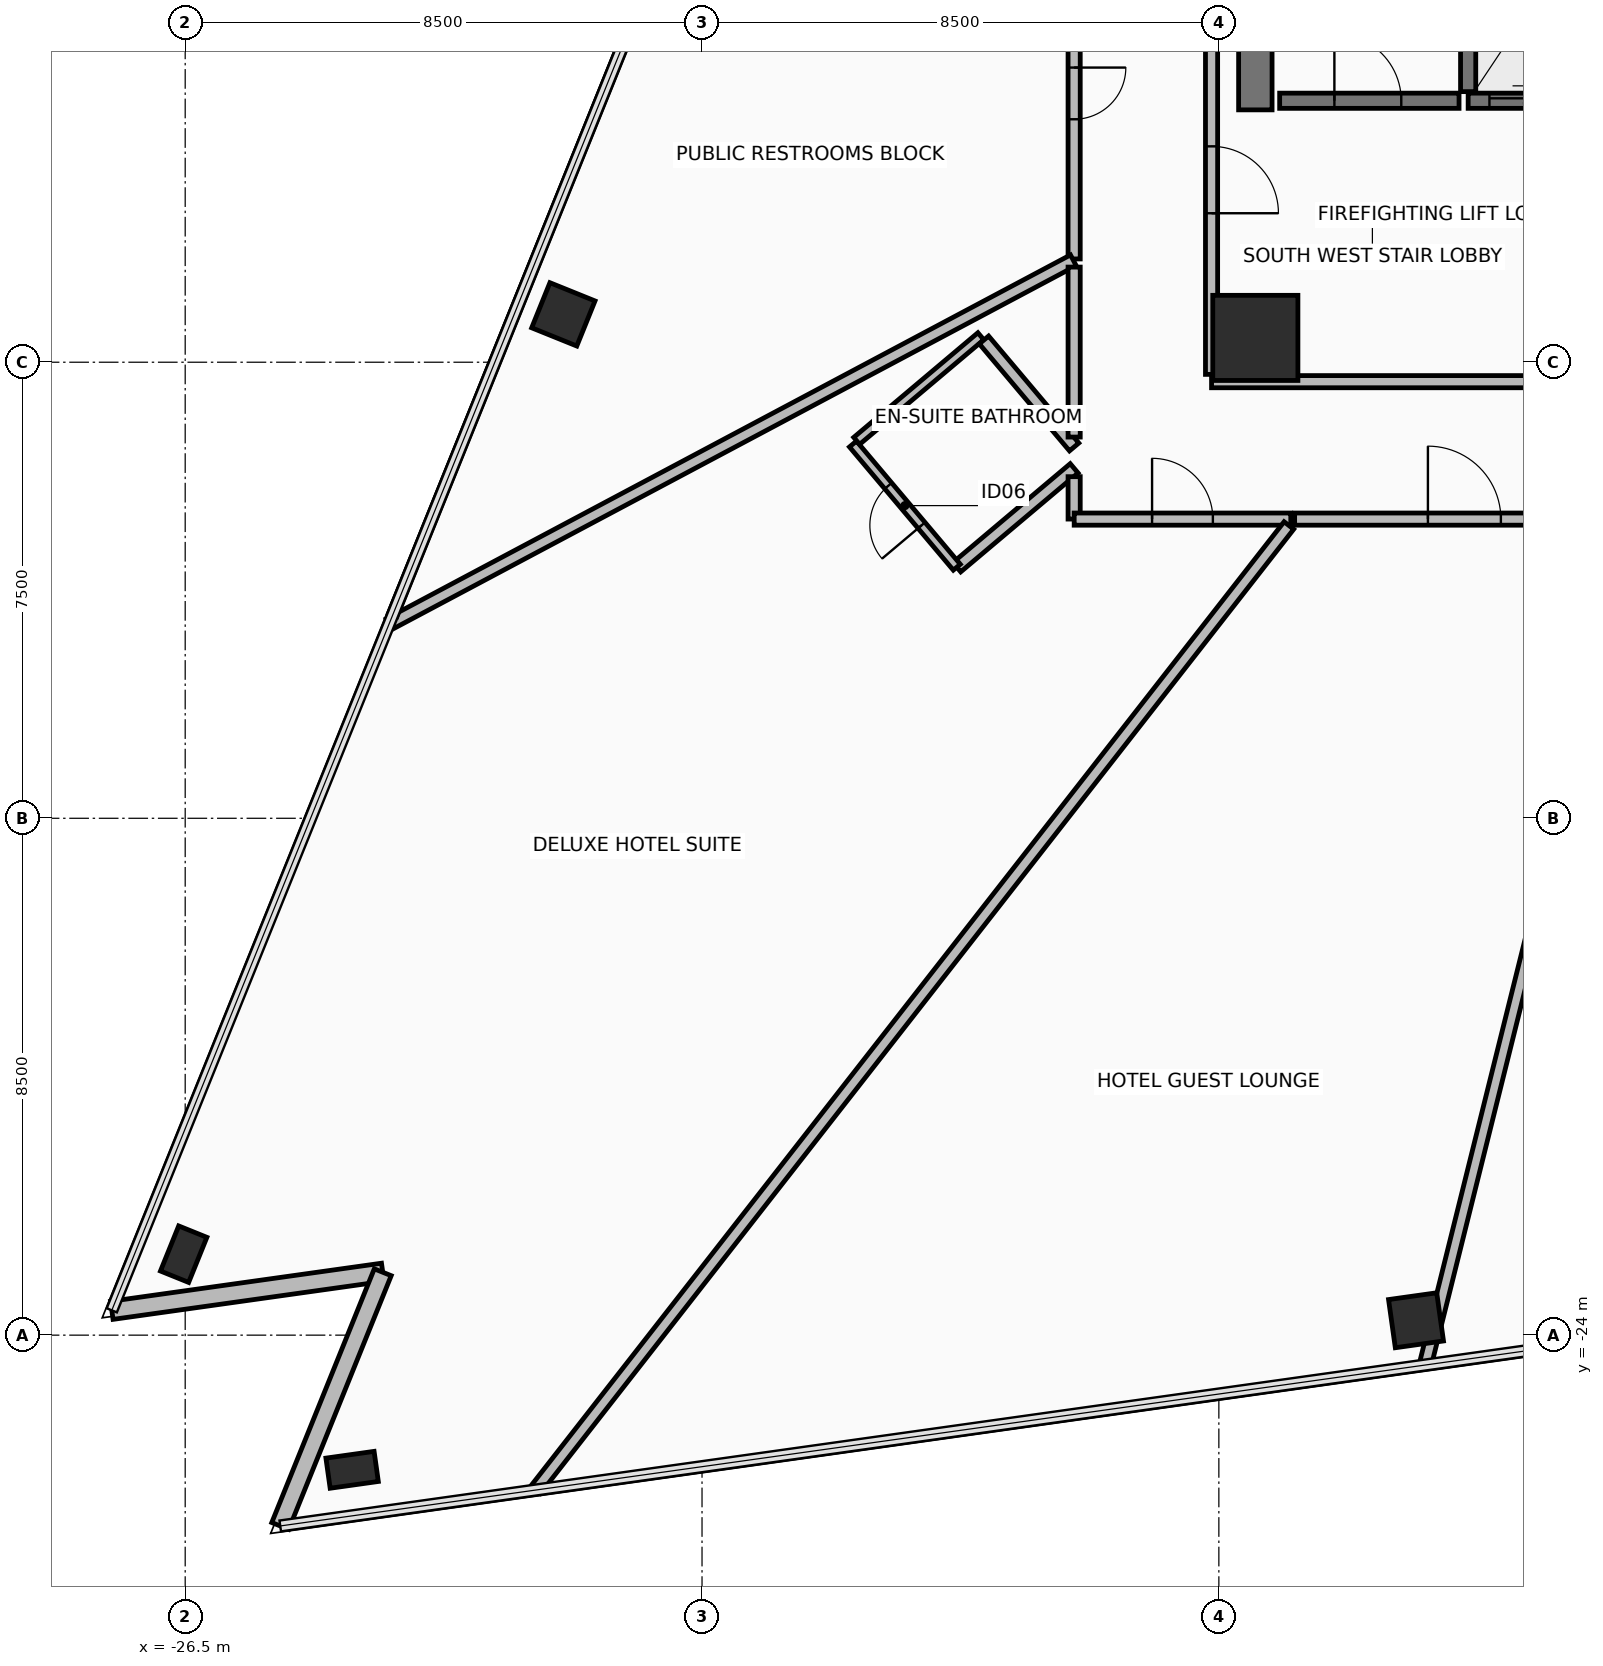
"""IFC4 building model, lengths in metres.
Left out: names, types, materials, properties, quantities, classifications, styles, units other than length and angle.
Written with IfcOpenShell. Run it as: python <this file> out.ifc"""

import sys

from ifc_helpers import new_model, si_unit, direction, frame, frame_2d, origin, origin_2d, place, context, subcontext, project, spatial, rectangle, hollow_rectangle, extrude, element, fill, save


model = new_model("IFC4")
c1 = context("Model", 3, precision=1e-05, world=origin(), true_north=direction((0.0, 1.0)))
c2 = subcontext(c1, "Body", "Model", "MODEL_VIEW")
j1 = project(units=[si_unit("LENGTHUNIT", "METRE"), si_unit("PLANEANGLEUNIT", "RADIAN")], contexts=[c1])
p1 = place(None, origin())
s1 = spatial("IfcSite", under=j1, at=p1, CompositionType="ELEMENT")
p2 = place(p1, origin())
s2 = spatial("IfcBuilding", under=s1, at=p2, CompositionType="ELEMENT")
p3 = place(p2, frame((0.0, 0.0, 77.65)))
s3 = spatial("IfcBuildingStorey", under=s2, at=p3, CompositionType="ELEMENT", Elevation=77.65)
p4 = place(p3, frame((-8.9, -7.6, 0.0), z_axis=(0.0, 0.0, 1.0), x_axis=(1.0, 0.0, 0.0)))
e1 = element("IfcColumn", 1, at=p4, inside=s3, PredefinedType="COLUMN", context=c2, shape_type="SweptSolid", body=[
    extrude(rectangle(XDim=1.4, YDim=1.4, at=origin_2d()), origin(), (0.0, 0.0, 1.0), 3.45),
])
p5 = place(p3, frame((-20.281, -7.213, 0.0), z_axis=(0.0, 0.0, 1.0), x_axis=(0.374608211656, 0.927183200754, 0.0)))
e2 = element("IfcColumn", 2, at=p5, inside=s3, PredefinedType="COLUMN", context=c2, shape_type="SweptSolid", body=[
    extrude(hollow_rectangle(XDim=0.8, YDim=0.8, WallThickness=0.045, at=origin_2d()), origin(), (0.0, 0.0, 1.0), 3.45),
])
for number, where, z_axis, x_axis in (
    (3, (-26.525, -22.668, 0.0), (0.0, 0.0, 1.0), (0.375, 0.927, 0.0)),
    (4, (-23.755, -26.214, 0.0), (0.0, 0.0, 1.0), (0.99, 0.139, 0.0)),
):
    element("IfcColumn", number, at=place(p3, frame(where, z_axis=z_axis, x_axis=x_axis)), inside=s3, PredefinedType="COLUMN", context=c2, shape_type="SweptSolid", body=[
        extrude(hollow_rectangle(XDim=0.5, YDim=0.8, WallThickness=0.04, at=origin_2d()), origin(), (0.0, 0.0, 1.0), 3.45),
    ])
p6 = place(p3, frame((-6.257, -23.755, 0.0), z_axis=(0.0, 0.0, 1.0), x_axis=(0.990268068742, 0.13917310096, 0.0)))
e5 = element("IfcColumn", 5, at=p6, inside=s3, PredefinedType="COLUMN", context=c2, shape_type="SweptSolid", body=[
    extrude(hollow_rectangle(XDim=0.8, YDim=0.8, WallThickness=0.045, at=origin_2d()), origin(), (0.0, 0.0, 1.0), 3.45),
])
p7 = place(p3, frame((-27.707, -23.592, 0.0), z_axis=(0.0, 0.0, 1.0), x_axis=(0.990269200152, 0.139165050317, 0.0)))
e6 = element("IfcWall", 6, at=p7, inside=s3, PredefinedType="STANDARD", context=c2, shape_type="SweptSolid", body=[
    extrude(rectangle(XDim=4.5, YDim=0.3, at=frame_2d((2.25, 0.0))), origin(), (0.0, 0.0, 1.0), 2.405),
])
p8 = place(p3, frame((-23.251, -22.966, 0.0), z_axis=(0.0, 0.0, 1.0), x_axis=(-0.374568898324, -0.927199083481, 0.0)))
e7 = element("IfcWall", 7, at=p8, inside=s3, PredefinedType="STANDARD", context=c2, shape_type="SweptSolid", body=[
    extrude(rectangle(XDim=4.5, YDim=0.3, at=frame_2d((2.25, 0.0))), origin(), (0.0, 0.0, 1.0), 2.405),
])
p9 = place(p3, frame((-8.9, -3.85, 0.0), z_axis=(0.0, 0.0, 1.0), x_axis=(0.0, 1.0, 0.0)))
e8 = element("IfcWall", 8, at=p9, inside=s3, PredefinedType="SHEAR", context=c2, shape_type="SweptSolid", body=[
    extrude(rectangle(XDim=10.7, YDim=0.55, at=frame_2d((5.35, 0.0))), origin(), (0.0, 0.0, 1.0), 3.21),
])
p10 = place(p3, frame((-9.62, -8.32, 0.0), z_axis=(0.0, 0.0, 1.0), x_axis=(1.0, 0.0, 0.0)))
e9 = element("IfcWall", 9, at=p10, inside=s3, PredefinedType="PARTITIONING", context=c2, shape_type="SweptSolid", body=[
    extrude(rectangle(XDim=19.24, YDim=0.2, at=frame_2d((9.62, 0.0))), origin(), (0.0, 0.0, 1.0), 2.605),
])
p11 = place(p10, frame((15.02, 0.0, 0.0)))
e10 = element("IfcOpeningElement", 10, at=p11, cuts=e9, PredefinedType="OPENING", context=c2, shape_type="SweptSolid", body=[
    extrude(rectangle(XDim=0.9, YDim=2.1, at=frame_2d((0.45, 1.05))), frame((0.0, 0.11, 0.0), z_axis=(0.0, -1.0, 0.0), x_axis=(1.0, 0.0, 0.0)), (0.0, 0.0, 1.0), 0.22),
])
p12 = place(p3, frame((-9.62, 8.2, 0.0), z_axis=(0.0, 0.0, 1.0), x_axis=(0.0, -1.0, 0.0)))
e11 = element("IfcWall", 11, at=p12, inside=s3, PredefinedType="PARTITIONING", context=c2, shape_type="SweptSolid", body=[
    extrude(rectangle(XDim=16.4, YDim=0.2, at=frame_2d((8.2, 0.0))), origin(), (0.0, 0.0, 1.0), 2.605),
])
p13 = place(p12, frame((12.65, 0.0, 0.0)))
e12 = element("IfcOpeningElement", 12, at=p13, cuts=e11, PredefinedType="OPENING", context=c2, shape_type="SweptSolid", body=[
    extrude(rectangle(XDim=1.1, YDim=2.15, at=frame_2d((0.55, 1.075))), frame((0.0, 0.11, 0.0), z_axis=(0.0, -1.0, 0.0), x_axis=(1.0, 0.0, 0.0)), (0.0, 0.0, 1.0), 0.22),
])
p14 = place(p3, frame((-5.4, -3.55, 0.0), z_axis=(0.0, 0.0, 1.0), x_axis=(0.0, 1.0, 0.0)))
e13 = element("IfcWall", 13, at=p14, inside=s3, PredefinedType="SHEAR", context=c2, shape_type="SweptSolid", body=[
    extrude(rectangle(XDim=7.3, YDim=0.25, at=frame_2d((3.65, 0.0))), origin(), (0.0, 0.0, 1.0), 3.21),
])
p15 = place(p3, frame((-8.5, -3.7, 0.0), z_axis=(0.0, 0.0, 1.0), x_axis=(1.0, 0.0, 0.0)))
e14 = element("IfcWall", 14, at=p15, inside=s3, PredefinedType="SHEAR", context=c2, shape_type="SweptSolid", body=[
    extrude(rectangle(XDim=2.95, YDim=0.25, at=frame_2d((1.475, 0.0))), origin(), (0.0, 0.0, 1.0), 3.21),
])
p16 = place(p15, frame((0.9, 0.0, 0.0)))
e15 = element("IfcOpeningElement", 15, at=p16, cuts=e14, PredefinedType="OPENING", context=c2, shape_type="SweptSolid", body=[
    extrude(rectangle(XDim=1.1, YDim=2.15, at=frame_2d((0.55, 1.075))), frame((0.0, 0.135, 0.0), z_axis=(0.0, -1.0, 0.0), x_axis=(1.0, 0.0, 0.0)), (0.0, 0.0, 1.0), 0.27),
])
p17 = place(p3, frame((-5.4, -3.7, 0.0), z_axis=(0.0, 0.0, 1.0), x_axis=(1.0, 0.0, 0.0)))
e16 = element("IfcWall", 16, at=p17, inside=s3, PredefinedType="SHEAR", context=c2, shape_type="SweptSolid", body=[
    extrude(rectangle(XDim=1.9, YDim=0.25, at=frame_2d((0.95, 0.0))), origin(), (0.0, 0.0, 1.0), 3.21),
])
p18 = place(p17, frame((0.35, 0.0, 0.0)))
e17 = element("IfcOpeningElement", 17, at=p18, cuts=e16, PredefinedType="OPENING", context=c2, shape_type="SweptSolid", body=[
    extrude(rectangle(XDim=1.2, YDim=2.2, at=frame_2d((0.6, 1.1))), frame((0.0, 0.135, 0.0), z_axis=(0.0, -1.0, 0.0), x_axis=(1.0, 0.0, 0.0)), (0.0, 0.0, 1.0), 0.27),
])
p19 = place(p3, frame((-11.88, -9.745, 0.0), z_axis=(0.0, 0.0, 1.0), x_axis=(-0.764712982519, -0.644371053328, 0.0)))
e18 = element("IfcWall", 18, at=p19, inside=s3, PredefinedType="PARTITIONING", context=c2, shape_type="SweptSolid", body=[
    extrude(rectangle(XDim=2.524, YDim=0.2, at=frame_2d((1.262, 0.0))), origin(), (0.0, 0.0, 1.0), 3.21),
])
p20 = place(p3, frame((-13.81, -11.371, 0.0), z_axis=(0.0, 0.0, 1.0), x_axis=(-0.644478981733, 0.764622025647, 0.0)))
e19 = element("IfcWall", 19, at=p20, inside=s3, PredefinedType="PARTITIONING", context=c2, shape_type="SweptSolid", body=[
    extrude(rectangle(XDim=2.65, YDim=0.15, at=frame_2d((1.325, 0.0))), origin(), (0.0, 0.0, 1.0), 2.805),
])
p21 = place(p20, frame((0.9, 0.0, 0.0)))
e20 = element("IfcOpeningElement", 20, at=p21, cuts=e19, PredefinedType="OPENING", context=c2, shape_type="SweptSolid", body=[
    extrude(rectangle(XDim=0.85, YDim=2.1, at=frame_2d((0.425, 1.05))), frame((0.0, 0.085, 0.0), z_axis=(0.0, -1.0, 0.0), x_axis=(1.0, 0.0, 0.0)), (0.0, 0.0, 1.0), 0.17),
])
p22 = place(p3, frame((-15.456, -9.293, 0.0), z_axis=(0.0, 0.0, 1.0), x_axis=(0.764709608169, 0.644375057846, 0.0)))
e21 = element("IfcWall", 21, at=p22, inside=s3, PredefinedType="PARTITIONING", context=c2, shape_type="SweptSolid", body=[
    extrude(rectangle(XDim=2.67, YDim=0.15, at=frame_2d((1.335, 0.0))), origin(), (0.0, 0.0, 1.0), 2.605),
])
p23 = place(p3, frame((-13.363, -7.634, 0.0), z_axis=(0.0, 0.0, 1.0), x_axis=(0.644400290836, -0.764688345125, 0.0)))
e22 = element("IfcWall", 22, at=p23, inside=s3, PredefinedType="PARTITIONING", context=c2, shape_type="SweptSolid", body=[
    extrude(rectangle(XDim=2.302, YDim=0.2, at=frame_2d((1.151, 0.0))), origin(), (0.0, 0.0, 1.0), 2.605),
])
p24 = place(p3, frame((-11.88, -0.857, 0.0), z_axis=(0.0, 0.0, 1.0), x_axis=(0.0, -1.0, 0.0)))
e23 = element("IfcWall", 23, at=p24, inside=s3, PredefinedType="PARTITIONING", context=c2, shape_type="SweptSolid", body=[
    extrude(rectangle(XDim=5.444, YDim=0.2, at=frame_2d((2.722, 0.0))), origin(), (0.0, 0.0, 1.0), 3.21),
])
p25 = place(p24, frame((2.297, 0.0, 0.0)))
e24 = element("IfcOpeningElement", 24, at=p25, cuts=e23, PredefinedType="OPENING", context=c2, shape_type="SweptSolid", body=[
    extrude(rectangle(XDim=0.85, YDim=2.1, at=frame_2d((0.425, 1.05))), frame((0.0, 0.11, 0.0), z_axis=(0.0, -1.0, 0.0), x_axis=(1.0, 0.0, 0.0)), (0.0, 0.0, 1.0), 0.22),
])
p26 = place(p3, frame((-11.893, -6.324, 0.0), z_axis=(0.0, 0.0, 1.0), x_axis=(-0.882946043117, -0.469474477416, 0.0)))
e25 = element("IfcWall", 25, at=p26, inside=s3, PredefinedType="PARTITIONING", context=c2, shape_type="SweptSolid", body=[
    extrude(rectangle(XDim=12.747, YDim=0.2, at=frame_2d((6.374, 0.0))), origin(), (0.0, 0.0, 1.0), 2.405),
])
p27 = place(p3, frame((-23.087, -12.156, 0.0), z_axis=(0.0, 0.0, 1.0), x_axis=(0.374605375648, 0.927184346576, 0.0)))
e26 = element("IfcWall", 26, at=p27, inside=s3, PredefinedType="PARTITIONING", context=c2, shape_type="SweptSolid", body=[
    extrude(rectangle(XDim=11.685, YDim=0.15, at=frame_2d((5.842, 0.0))), origin(), (0.0, 0.0, 1.0), 3.21),
])
p28 = place(p3, frame((-11.88, -6.436, 0.0), z_axis=(0.0, 0.0, 1.0), x_axis=(0.0, -1.0, 0.0)))
e27 = element("IfcWall", 27, at=p28, inside=s3, PredefinedType="PARTITIONING", context=c2, shape_type="SweptSolid", body=[
    extrude(rectangle(XDim=2.795, YDim=0.2, at=frame_2d((1.397, 0.0))), origin(), (0.0, 0.0, 1.0), 2.605),
])
p29 = place(p3, frame((-11.88, -9.882, 0.0), z_axis=(0.0, 0.0, 1.0), x_axis=(0.0, -1.0, 0.0)))
e28 = element("IfcWall", 28, at=p29, inside=s3, PredefinedType="PARTITIONING", context=c2, shape_type="SweptSolid", body=[
    extrude(rectangle(XDim=0.697, YDim=0.2, at=frame_2d((0.349, 0.0))), origin(), (0.0, 0.0, 1.0), 2.605),
])
p30 = place(p3, frame((-11.879, -10.58, 0.0), z_axis=(0.0, 0.0, 1.0), x_axis=(1.0, 0.0, 0.0)))
e29 = element("IfcWall", 29, at=p30, inside=s3, PredefinedType="PARTITIONING", context=c2, shape_type="SweptSolid", body=[
    extrude(rectangle(XDim=3.562, YDim=0.2, at=frame_2d((1.781, 0.0))), origin(), (0.0, 0.0, 1.0), 2.605),
])
p31 = place(p30, frame((1.281, 0.0, 0.0)))
e30 = element("IfcOpeningElement", 30, at=p31, cuts=e29, PredefinedType="OPENING", context=c2, shape_type="SweptSolid", body=[
    extrude(rectangle(XDim=1.0, YDim=2.15, at=frame_2d((0.5, 1.075))), frame((0.0, 0.11, 0.0), z_axis=(0.0, -1.0, 0.0), x_axis=(1.0, 0.0, 0.0)), (0.0, 0.0, 1.0), 0.22),
])
p32 = place(p3, frame((-8.348, -10.685, 0.0), z_axis=(0.0, 0.0, 1.0), x_axis=(-0.615661230884, -0.788010944585, 0.0)))
e31 = element("IfcWall", 31, at=p32, inside=s3, PredefinedType="PARTITIONING", context=c2, shape_type="SweptSolid", body=[
    extrude(rectangle(XDim=20.121, YDim=0.2, at=frame_2d((10.06, 0.0))), origin(), (0.0, 0.0, 1.0), 2.405),
])
p33 = place(p3, frame((-8.254, -10.58, 0.0), z_axis=(0.0, 0.0, 1.0), x_axis=(1.0, 0.0, 0.0)))
e32 = element("IfcWall", 32, at=p33, inside=s3, PredefinedType="PARTITIONING", context=c2, shape_type="SweptSolid", body=[
    extrude(rectangle(XDim=5.584, YDim=0.2, at=frame_2d((2.792, 0.0))), origin(), (0.0, 0.0, 1.0), 2.605),
])
p34 = place(p33, frame((2.192, 0.0, 0.0)))
e33 = element("IfcOpeningElement", 33, at=p34, cuts=e32, PredefinedType="OPENING", context=c2, shape_type="SweptSolid", body=[
    extrude(rectangle(XDim=1.2, YDim=2.15, at=frame_2d((0.6, 1.075))), frame((0.0, 0.11, 0.0), z_axis=(0.0, -1.0, 0.0), x_axis=(1.0, 0.0, 0.0)), (0.0, 0.0, 1.0), 0.22),
])
p35 = place(p3, frame((-2.646, -10.611, 0.0), z_axis=(0.0, 0.0, 1.0), x_axis=(-0.241928502378, -0.970294078997, 0.0)))
e34 = element("IfcWall", 34, at=p35, inside=s3, PredefinedType="PARTITIONING", context=c2, shape_type="SweptSolid", body=[
    extrude(rectangle(XDim=14.289, YDim=0.2, at=frame_2d((7.144, 0.0))), origin(), (0.0, 0.0, 1.0), 2.405),
])
p36 = place(p13, frame((1.1, 0.0, 0.0), z_axis=(0.0, 0.0, 1.0), x_axis=(-1.0, 0.0, 0.0)))
e35 = element("IfcDoor", 35, at=p36, inside=s3, OperationType="SINGLE_SWING_LEFT", PredefinedType="DOOR", context=c2, shape_type="SweptSolid", body=[
    extrude(rectangle(XDim=1.1, YDim=2.15, at=frame_2d((0.55, 1.075))), frame((0.0, 0.025, 0.0), z_axis=(0.0, -1.0, 0.0), x_axis=(1.0, 0.0, 0.0)), (0.0, 0.0, 1.0), 0.05),
])
fill(e12, e35)
p37 = place(p16, origin())
e36 = element("IfcDoor", 36, at=p37, inside=s3, OperationType="SINGLE_SWING_LEFT", PredefinedType="DOOR", context=c2, shape_type="SweptSolid", body=[
    extrude(rectangle(XDim=1.1, YDim=2.15, at=frame_2d((0.55, 1.075))), frame((0.0, 0.025, 0.0), z_axis=(0.0, -1.0, 0.0), x_axis=(1.0, 0.0, 0.0)), (0.0, 0.0, 1.0), 0.05),
])
fill(e15, e36)
p38 = place(p18, origin())
e37 = element("IfcDoor", 37, at=p38, inside=s3, OperationType="SLIDING_TO_RIGHT", PredefinedType="DOOR", context=c2, shape_type="SweptSolid", body=[
    extrude(rectangle(XDim=1.2, YDim=2.2, at=frame_2d((0.6, 1.1))), frame((0.0, 0.025, 0.0), z_axis=(0.0, -1.0, 0.0), x_axis=(1.0, 0.0, 0.0)), (0.0, 0.0, 1.0), 0.05),
])
fill(e17, e37)
p39 = place(p21, origin())
e38 = element("IfcDoor", 38, at=p39, inside=s3, OperationType="SINGLE_SWING_RIGHT", PredefinedType="DOOR", context=c2, shape_type="SweptSolid", body=[
    extrude(rectangle(XDim=0.85, YDim=2.1, at=frame_2d((0.425, 1.05))), frame((0.0, 0.025, 0.0), z_axis=(0.0, -1.0, 0.0), x_axis=(1.0, 0.0, 0.0)), (0.0, 0.0, 1.0), 0.05),
])
fill(e20, e38)
p40 = place(p25, origin())
e39 = element("IfcDoor", 39, at=p40, inside=s3, OperationType="SINGLE_SWING_RIGHT", PredefinedType="DOOR", context=c2, shape_type="SweptSolid", body=[
    extrude(rectangle(XDim=0.85, YDim=2.1, at=frame_2d((0.425, 1.05))), frame((0.0, 0.025, 0.0), z_axis=(0.0, -1.0, 0.0), x_axis=(1.0, 0.0, 0.0)), (0.0, 0.0, 1.0), 0.05),
])
fill(e24, e39)
p41 = place(p31, origin())
e40 = element("IfcDoor", 40, at=p41, inside=s3, OperationType="SINGLE_SWING_LEFT", PredefinedType="DOOR", context=c2, shape_type="SweptSolid", body=[
    extrude(rectangle(XDim=1.0, YDim=2.15, at=frame_2d((0.5, 1.075))), frame((0.0, 0.025, 0.0), z_axis=(0.0, -1.0, 0.0), x_axis=(1.0, 0.0, 0.0)), (0.0, 0.0, 1.0), 0.05),
])
fill(e30, e40)
p42 = place(p34, origin())
e41 = element("IfcDoor", 41, at=p42, inside=s3, OperationType="SINGLE_SWING_LEFT", PredefinedType="DOOR", context=c2, shape_type="SweptSolid", body=[
    extrude(rectangle(XDim=1.2, YDim=2.15, at=frame_2d((0.6, 1.075))), frame((0.0, 0.025, 0.0), z_axis=(0.0, -1.0, 0.0), x_axis=(1.0, 0.0, 0.0)), (0.0, 0.0, 1.0), 0.05),
])
fill(e33, e41)
save(model, sys.argv[1])
